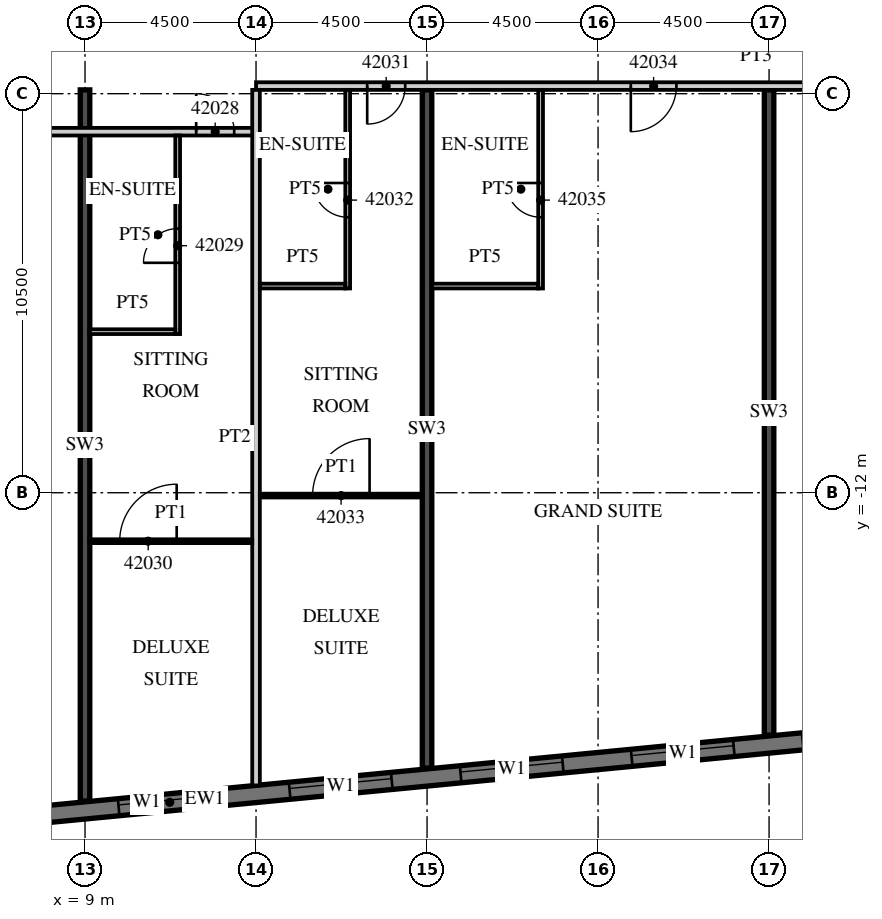
"""IFC4 building model, lengths in metres.
Left out: names, types, materials, properties, quantities, classifications, styles, units other than length and angle.
Written with IfcOpenShell. Run it as: python <this file> out.ifc"""

import sys

from ifc_helpers import new_model, si_unit, direction, frame, frame_2d, origin, place, context, subcontext, project, spatial, rectangle, extrude, element, fill, save


model = new_model("IFC4")
c1 = context("Model", 3, precision=1e-05, world=origin(), true_north=direction((0.0, 1.0)))
c2 = subcontext(c1, "Body", "Model", "MODEL_VIEW")
j1 = project(units=[si_unit("LENGTHUNIT", "METRE"), si_unit("PLANEANGLEUNIT", "RADIAN")], contexts=[c1])
p1 = place(None, origin())
s1 = spatial("IfcSite", under=j1, at=p1, CompositionType="ELEMENT")
p2 = place(p1, origin())
s2 = spatial("IfcBuilding", under=s1, at=p2, CompositionType="ELEMENT")
p3 = place(p2, frame((0.0, 0.0, 180.1)))
s3 = spatial("IfcBuildingStorey", under=s2, at=p3, CompositionType="ELEMENT", Elevation=180.1)
p4 = place(p3, frame((9.0, -20.112, 0.0), z_axis=(0.0, 0.0, 1.0), x_axis=(0.0, 1.0, 0.0)))
e1 = element("IfcWall", 1, at=p4, inside=s3, PredefinedType="SHEAR", context=c2, shape_type="SweptSolid", body=[
    extrude(rectangle(XDim=18.712, YDim=0.25, at=frame_2d((9.356, 0.0))), origin(), (0.0, 0.0, 1.0), 3.3),
])
p5 = place(p3, frame((18.0, -19.245, 0.0), z_axis=(0.0, 0.0, 1.0), x_axis=(0.0, 1.0, 0.0)))
e2 = element("IfcWall", 2, at=p5, inside=s3, PredefinedType="SHEAR", context=c2, shape_type="SweptSolid", body=[
    extrude(rectangle(XDim=17.845, YDim=0.25, at=frame_2d((8.923, 0.0))), origin(), (0.0, 0.0, 1.0), 3.3),
])
p6 = place(p3, frame((27.0, -18.379, 0.0), z_axis=(0.0, 0.0, 1.0), x_axis=(0.0, 1.0, 0.0)))
e3 = element("IfcWall", 3, at=p6, inside=s3, PredefinedType="SHEAR", context=c2, shape_type="SweptSolid", body=[
    extrude(rectangle(XDim=16.979, YDim=0.25, at=frame_2d((8.489, 0.0))), origin(), (0.0, 0.0, 1.0), 3.3),
])
p7 = place(p3, frame((-13.521, -22.529, 0.0), z_axis=(0.0, 0.0, 1.0), x_axis=(0.995396436651, 0.095843277819, 0.0)))
e4 = element("IfcWall", 4, at=p7, inside=s3, PredefinedType="SOLIDWALL", context=c2, shape_type="SweptSolid", body=[
    extrude(rectangle(XDim=51.578, YDim=0.45, at=frame_2d((25.789, 0.0))), origin(), (0.0, 0.0, 1.0), 3.02),
])
p8 = place(p7, frame((0.91, 0.0, 0.45)))
e5 = element("IfcOpeningElement", 5, at=p8, cuts=e4, PredefinedType="OPENING", context=c2, shape_type="SweptSolid", body=[
    extrude(rectangle(XDim=2.7, YDim=2.25, at=frame_2d((1.35, 1.125))), frame((0.0, 0.235, 0.0), z_axis=(0.0, -1.0, 0.0), x_axis=(1.0, 0.0, 0.0)), (0.0, 0.0, 1.0), 0.47),
])
p9 = place(p7, frame((5.431, 0.0, 0.45)))
e6 = element("IfcOpeningElement", 6, at=p9, cuts=e4, PredefinedType="OPENING", context=c2, shape_type="SweptSolid", body=[
    extrude(rectangle(XDim=2.7, YDim=2.25, at=frame_2d((1.35, 1.125))), frame((0.0, 0.235, 0.0), z_axis=(0.0, -1.0, 0.0), x_axis=(1.0, 0.0, 0.0)), (0.0, 0.0, 1.0), 0.47),
])
p10 = place(p7, frame((9.952, 0.0, 0.45)))
e7 = element("IfcOpeningElement", 7, at=p10, cuts=e4, PredefinedType="OPENING", context=c2, shape_type="SweptSolid", body=[
    extrude(rectangle(XDim=2.7, YDim=2.25, at=frame_2d((1.35, 1.125))), frame((0.0, 0.235, 0.0), z_axis=(0.0, -1.0, 0.0), x_axis=(1.0, 0.0, 0.0)), (0.0, 0.0, 1.0), 0.47),
])
p11 = place(p7, frame((14.473, 0.0, 0.45)))
e8 = element("IfcOpeningElement", 8, at=p11, cuts=e4, PredefinedType="OPENING", context=c2, shape_type="SweptSolid", body=[
    extrude(rectangle(XDim=2.7, YDim=2.25, at=frame_2d((1.35, 1.125))), frame((0.0, 0.235, 0.0), z_axis=(0.0, -1.0, 0.0), x_axis=(1.0, 0.0, 0.0)), (0.0, 0.0, 1.0), 0.47),
])
p12 = place(p7, frame((18.994, 0.0, 0.45)))
e9 = element("IfcOpeningElement", 9, at=p12, cuts=e4, PredefinedType="OPENING", context=c2, shape_type="SweptSolid", body=[
    extrude(rectangle(XDim=2.7, YDim=2.25, at=frame_2d((1.35, 1.125))), frame((0.0, 0.235, 0.0), z_axis=(0.0, -1.0, 0.0), x_axis=(1.0, 0.0, 0.0)), (0.0, 0.0, 1.0), 0.47),
])
p13 = place(p7, frame((23.514, 0.0, 0.45)))
e10 = element("IfcOpeningElement", 10, at=p13, cuts=e4, PredefinedType="OPENING", context=c2, shape_type="SweptSolid", body=[
    extrude(rectangle(XDim=2.7, YDim=2.25, at=frame_2d((1.35, 1.125))), frame((0.0, 0.235, 0.0), z_axis=(0.0, -1.0, 0.0), x_axis=(1.0, 0.0, 0.0)), (0.0, 0.0, 1.0), 0.47),
])
p14 = place(p7, frame((28.035, 0.0, 0.45)))
e11 = element("IfcOpeningElement", 11, at=p14, cuts=e4, PredefinedType="OPENING", context=c2, shape_type="SweptSolid", body=[
    extrude(rectangle(XDim=2.7, YDim=2.25, at=frame_2d((1.35, 1.125))), frame((0.0, 0.235, 0.0), z_axis=(0.0, -1.0, 0.0), x_axis=(1.0, 0.0, 0.0)), (0.0, 0.0, 1.0), 0.47),
])
p15 = place(p7, frame((32.556, 0.0, 0.45)))
e12 = element("IfcOpeningElement", 12, at=p15, cuts=e4, PredefinedType="OPENING", context=c2, shape_type="SweptSolid", body=[
    extrude(rectangle(XDim=2.7, YDim=2.25, at=frame_2d((1.35, 1.125))), frame((0.0, 0.235, 0.0), z_axis=(0.0, -1.0, 0.0), x_axis=(1.0, 0.0, 0.0)), (0.0, 0.0, 1.0), 0.47),
])
p16 = place(p7, frame((37.077, 0.0, 0.45)))
e13 = element("IfcOpeningElement", 13, at=p16, cuts=e4, PredefinedType="OPENING", context=c2, shape_type="SweptSolid", body=[
    extrude(rectangle(XDim=2.7, YDim=2.25, at=frame_2d((1.35, 1.125))), frame((0.0, 0.235, 0.0), z_axis=(0.0, -1.0, 0.0), x_axis=(1.0, 0.0, 0.0)), (0.0, 0.0, 1.0), 0.47),
])
p17 = place(p7, frame((41.598, 0.0, 0.45)))
e14 = element("IfcOpeningElement", 14, at=p17, cuts=e4, PredefinedType="OPENING", context=c2, shape_type="SweptSolid", body=[
    extrude(rectangle(XDim=2.7, YDim=2.25, at=frame_2d((1.35, 1.125))), frame((0.0, 0.235, 0.0), z_axis=(0.0, -1.0, 0.0), x_axis=(1.0, 0.0, 0.0)), (0.0, 0.0, 1.0), 0.47),
])
p18 = place(p7, frame((46.119, 0.0, 0.45)))
e15 = element("IfcOpeningElement", 15, at=p18, cuts=e4, PredefinedType="OPENING", context=c2, shape_type="SweptSolid", body=[
    extrude(rectangle(XDim=2.7, YDim=2.25, at=frame_2d((1.35, 1.125))), frame((0.0, 0.235, 0.0), z_axis=(0.0, -1.0, 0.0), x_axis=(1.0, 0.0, 0.0)), (0.0, 0.0, 1.0), 0.47),
])
p19 = place(p3, frame((-13.5, -2.5, 0.0), z_axis=(0.0, 0.0, 1.0), x_axis=(1.0, 0.0, 0.0)))
e16 = element("IfcWall", 16, at=p19, inside=s3, PredefinedType="PARTITIONING", context=c2, shape_type="SweptSolid", body=[
    extrude(rectangle(XDim=27.0, YDim=0.2, at=frame_2d((13.5, 0.0))), origin(), (0.0, 0.0, 1.0), 3.02),
])
p20 = place(p19, frame((2.925, 0.0, 0.0)))
e17 = element("IfcOpeningElement", 17, at=p20, cuts=e16, PredefinedType="OPENING", context=c2, shape_type="SweptSolid", body=[
    extrude(rectangle(XDim=1.0, YDim=2.1, at=frame_2d((0.5, 1.05))), frame((0.0, 0.11, 0.0), z_axis=(0.0, -1.0, 0.0), x_axis=(1.0, 0.0, 0.0)), (0.0, 0.0, 1.0), 0.22),
])
p21 = place(p19, frame((7.45, 0.0, 0.0)))
e18 = element("IfcOpeningElement", 18, at=p21, cuts=e16, PredefinedType="OPENING", context=c2, shape_type="SweptSolid", body=[
    extrude(rectangle(XDim=1.0, YDim=2.1, at=frame_2d((0.5, 1.05))), frame((0.0, 0.11, 0.0), z_axis=(0.0, -1.0, 0.0), x_axis=(1.0, 0.0, 0.0)), (0.0, 0.0, 1.0), 0.22),
])
p22 = place(p19, frame((11.925, 0.0, 0.0)))
e19 = element("IfcOpeningElement", 19, at=p22, cuts=e16, PredefinedType="OPENING", context=c2, shape_type="SweptSolid", body=[
    extrude(rectangle(XDim=1.0, YDim=2.1, at=frame_2d((0.5, 1.05))), frame((0.0, 0.11, 0.0), z_axis=(0.0, -1.0, 0.0), x_axis=(1.0, 0.0, 0.0)), (0.0, 0.0, 1.0), 0.22),
])
p23 = place(p19, frame((18.862, 0.0, 0.0)))
e20 = element("IfcOpeningElement", 20, at=p23, cuts=e16, PredefinedType="OPENING", context=c2, shape_type="SweptSolid", body=[
    extrude(rectangle(XDim=1.2, YDim=2.1, at=frame_2d((0.6, 1.05))), frame((0.0, 0.11, 0.0), z_axis=(0.0, -1.0, 0.0), x_axis=(1.0, 0.0, 0.0)), (0.0, 0.0, 1.0), 0.22),
])
p24 = place(p19, frame((25.425, 0.0, 0.0)))
e21 = element("IfcOpeningElement", 21, at=p24, cuts=e16, PredefinedType="OPENING", context=c2, shape_type="SweptSolid", body=[
    extrude(rectangle(XDim=1.0, YDim=2.1, at=frame_2d((0.5, 1.05))), frame((0.0, 0.11, 0.0), z_axis=(0.0, -1.0, 0.0), x_axis=(1.0, 0.0, 0.0)), (0.0, 0.0, 1.0), 0.22),
])
p25 = place(p3, frame((13.5, -1.3, 0.0), z_axis=(0.0, 0.0, 1.0), x_axis=(1.0, 0.0, 0.0)))
e22 = element("IfcWall", 22, at=p25, inside=s3, PredefinedType="PARTITIONING", context=c2, shape_type="SweptSolid", body=[
    extrude(rectangle(XDim=26.317, YDim=0.2, at=frame_2d((13.158, 0.0))), origin(), (0.0, 0.0, 1.0), 3.02),
])
p26 = place(p25, frame((2.925, 0.0, 0.0)))
e23 = element("IfcOpeningElement", 23, at=p26, cuts=e22, PredefinedType="OPENING", context=c2, shape_type="SweptSolid", body=[
    extrude(rectangle(XDim=1.0, YDim=2.1, at=frame_2d((0.5, 1.05))), frame((0.0, 0.11, 0.0), z_axis=(0.0, -1.0, 0.0), x_axis=(1.0, 0.0, 0.0)), (0.0, 0.0, 1.0), 0.22),
])
p27 = place(p25, frame((9.862, 0.0, 0.0)))
e24 = element("IfcOpeningElement", 24, at=p27, cuts=e22, PredefinedType="OPENING", context=c2, shape_type="SweptSolid", body=[
    extrude(rectangle(XDim=1.2, YDim=2.1, at=frame_2d((0.6, 1.05))), frame((0.0, 0.11, 0.0), z_axis=(0.0, -1.0, 0.0), x_axis=(1.0, 0.0, 0.0)), (0.0, 0.0, 1.0), 0.22),
])
p28 = place(p25, frame((15.938, 0.0, 0.0)))
e25 = element("IfcOpeningElement", 25, at=p28, cuts=e22, PredefinedType="OPENING", context=c2, shape_type="SweptSolid", body=[
    extrude(rectangle(XDim=1.2, YDim=2.1, at=frame_2d((0.6, 1.05))), frame((0.0, 0.11, 0.0), z_axis=(0.0, -1.0, 0.0), x_axis=(1.0, 0.0, 0.0)), (0.0, 0.0, 1.0), 0.22),
])
p29 = place(p25, frame((25.208, 0.0, 0.0)))
e26 = element("IfcOpeningElement", 26, at=p29, cuts=e22, PredefinedType="OPENING", context=c2, shape_type="SweptSolid", body=[
    extrude(rectangle(XDim=0.9, YDim=2.1, at=frame_2d((0.45, 1.05))), frame((0.0, 0.11, 0.0), z_axis=(0.0, -1.0, 0.0), x_axis=(1.0, 0.0, 0.0)), (0.0, 0.0, 1.0), 0.22),
])
p30 = place(p3, frame((13.5, -19.701, 0.0), z_axis=(0.0, 0.0, 1.0), x_axis=(0.0, 1.0, 0.0)))
e27 = element("IfcWall", 27, at=p30, inside=s3, PredefinedType="PARTITIONING", context=c2, shape_type="SweptSolid", body=[
    extrude(rectangle(XDim=18.301, YDim=0.2, at=frame_2d((9.15, 0.0))), origin(), (0.0, 0.0, 1.0), 3.02),
])
p31 = place(p3, frame((11.438, -7.825, 0.0), z_axis=(0.0, 0.0, 1.0), x_axis=(0.0, 1.0, 0.0)))
e28 = element("IfcWall", 28, at=p31, inside=s3, PredefinedType="PARTITIONING", context=c2, shape_type="SweptSolid", body=[
    extrude(rectangle(XDim=5.225, YDim=0.125, at=frame_2d((2.612, 0.0))), origin(), (0.0, 0.0, 1.0), 3.02),
])
p32 = place(p31, frame((1.875, 0.0, 0.0)))
e29 = element("IfcOpeningElement", 29, at=p32, cuts=e28, PredefinedType="OPENING", context=c2, shape_type="SweptSolid", body=[
    extrude(rectangle(XDim=0.9, YDim=2.1, at=frame_2d((0.45, 1.05))), frame((0.0, 0.073, 0.0), z_axis=(0.0, -1.0, 0.0), x_axis=(1.0, 0.0, 0.0)), (0.0, 0.0, 1.0), 0.145),
])
p33 = place(p3, frame((9.125, -7.762, 0.0), z_axis=(0.0, 0.0, 1.0), x_axis=(1.0, 0.0, 0.0)))
e30 = element("IfcWall", 30, at=p33, inside=s3, PredefinedType="PARTITIONING", context=c2, shape_type="SweptSolid", body=[
    extrude(rectangle(XDim=2.25, YDim=0.125, at=frame_2d((1.125, 0.0))), origin(), (0.0, 0.0, 1.0), 3.02),
])
p34 = place(p3, frame((9.125, -13.275, 0.0), z_axis=(0.0, 0.0, 1.0), x_axis=(1.0, 0.0, 0.0)))
e31 = element("IfcWall", 31, at=p34, inside=s3, PredefinedType="PARTITIONING", context=c2, shape_type="SweptSolid", body=[
    extrude(rectangle(XDim=4.275, YDim=0.1, at=frame_2d((2.137, 0.0))), origin(), (0.0, 0.0, 1.0), 3.02),
])
p35 = place(p34, frame((0.787, 0.0, 0.0)))
e32 = element("IfcOpeningElement", 32, at=p35, cuts=e31, PredefinedType="OPENING", context=c2, shape_type="SweptSolid", body=[
    extrude(rectangle(XDim=1.5, YDim=2.1, at=frame_2d((0.75, 1.05))), frame((0.0, 0.06, 0.0), z_axis=(0.0, -1.0, 0.0), x_axis=(1.0, 0.0, 0.0)), (0.0, 0.0, 1.0), 0.12),
])
p36 = place(p3, frame((15.912, -6.625, 0.0), z_axis=(0.0, 0.0, 1.0), x_axis=(0.0, 1.0, 0.0)))
e33 = element("IfcWall", 33, at=p36, inside=s3, PredefinedType="PARTITIONING", context=c2, shape_type="SweptSolid", body=[
    extrude(rectangle(XDim=5.225, YDim=0.125, at=frame_2d((2.613, 0.0))), origin(), (0.0, 0.0, 1.0), 3.02),
])
p37 = place(p36, frame((1.875, 0.0, 0.0)))
e34 = element("IfcOpeningElement", 34, at=p37, cuts=e33, PredefinedType="OPENING", context=c2, shape_type="SweptSolid", body=[
    extrude(rectangle(XDim=0.9, YDim=2.1, at=frame_2d((0.45, 1.05))), frame((0.0, 0.073, 0.0), z_axis=(0.0, -1.0, 0.0), x_axis=(1.0, 0.0, 0.0)), (0.0, 0.0, 1.0), 0.145),
])
p38 = place(p3, frame((13.6, -6.562, 0.0), z_axis=(0.0, 0.0, 1.0), x_axis=(1.0, 0.0, 0.0)))
e35 = element("IfcWall", 35, at=p38, inside=s3, PredefinedType="PARTITIONING", context=c2, shape_type="SweptSolid", body=[
    extrude(rectangle(XDim=2.25, YDim=0.125, at=frame_2d((1.125, 0.0))), origin(), (0.0, 0.0, 1.0), 3.02),
])
p39 = place(p3, frame((13.6, -12.075, 0.0), z_axis=(0.0, 0.0, 1.0), x_axis=(1.0, 0.0, 0.0)))
e36 = element("IfcWall", 36, at=p39, inside=s3, PredefinedType="PARTITIONING", context=c2, shape_type="SweptSolid", body=[
    extrude(rectangle(XDim=4.275, YDim=0.1, at=frame_2d((2.137, 0.0))), origin(), (0.0, 0.0, 1.0), 3.02),
])
p40 = place(p39, frame((1.388, 0.0, 0.0)))
e37 = element("IfcOpeningElement", 37, at=p40, cuts=e36, PredefinedType="OPENING", context=c2, shape_type="SweptSolid", body=[
    extrude(rectangle(XDim=1.5, YDim=2.1, at=frame_2d((0.75, 1.05))), frame((0.0, 0.06, 0.0), z_axis=(0.0, -1.0, 0.0), x_axis=(1.0, 0.0, 0.0)), (0.0, 0.0, 1.0), 0.12),
])
p41 = place(p3, frame((20.988, -6.625, 0.0), z_axis=(0.0, 0.0, 1.0), x_axis=(0.0, 1.0, 0.0)))
e38 = element("IfcWall", 38, at=p41, inside=s3, PredefinedType="PARTITIONING", context=c2, shape_type="SweptSolid", body=[
    extrude(rectangle(XDim=5.225, YDim=0.125, at=frame_2d((2.613, 0.0))), origin(), (0.0, 0.0, 1.0), 3.02),
])
p42 = place(p41, frame((1.875, 0.0, 0.0)))
e39 = element("IfcOpeningElement", 39, at=p42, cuts=e38, PredefinedType="OPENING", context=c2, shape_type="SweptSolid", body=[
    extrude(rectangle(XDim=0.9, YDim=2.1, at=frame_2d((0.45, 1.05))), frame((0.0, 0.073, 0.0), z_axis=(0.0, -1.0, 0.0), x_axis=(1.0, 0.0, 0.0)), (0.0, 0.0, 1.0), 0.145),
])
p43 = place(p3, frame((18.125, -6.562, 0.0), z_axis=(0.0, 0.0, 1.0), x_axis=(1.0, 0.0, 0.0)))
e40 = element("IfcWall", 40, at=p43, inside=s3, PredefinedType="PARTITIONING", context=c2, shape_type="SweptSolid", body=[
    extrude(rectangle(XDim=2.8, YDim=0.125, at=frame_2d((1.4, 0.0))), origin(), (0.0, 0.0, 1.0), 3.02),
])
p44 = place(p13, origin())
e41 = element("IfcWindow", 41, at=p44, inside=s3, PartitioningType="SINGLE_PANEL", PredefinedType="WINDOW", context=c2, shape_type="SweptSolid", body=[
    extrude(rectangle(XDim=2.7, YDim=2.25, at=frame_2d((1.35, 1.125))), frame((0.0, 0.09, 0.0), z_axis=(0.0, -1.0, 0.0), x_axis=(1.0, 0.0, 0.0)), (0.0, 0.0, 1.0), 0.06),
])
fill(e10, e41)
p45 = place(p14, origin())
e42 = element("IfcWindow", 42, at=p45, inside=s3, PartitioningType="SINGLE_PANEL", PredefinedType="WINDOW", context=c2, shape_type="SweptSolid", body=[
    extrude(rectangle(XDim=2.7, YDim=2.25, at=frame_2d((1.35, 1.125))), frame((0.0, 0.09, 0.0), z_axis=(0.0, -1.0, 0.0), x_axis=(1.0, 0.0, 0.0)), (0.0, 0.0, 1.0), 0.06),
])
fill(e11, e42)
p46 = place(p15, origin())
e43 = element("IfcWindow", 43, at=p46, inside=s3, PartitioningType="SINGLE_PANEL", PredefinedType="WINDOW", context=c2, shape_type="SweptSolid", body=[
    extrude(rectangle(XDim=2.7, YDim=2.25, at=frame_2d((1.35, 1.125))), frame((0.0, 0.09, 0.0), z_axis=(0.0, -1.0, 0.0), x_axis=(1.0, 0.0, 0.0)), (0.0, 0.0, 1.0), 0.06),
])
fill(e12, e43)
p47 = place(p16, origin())
e44 = element("IfcWindow", 44, at=p47, inside=s3, PartitioningType="SINGLE_PANEL", PredefinedType="WINDOW", context=c2, shape_type="SweptSolid", body=[
    extrude(rectangle(XDim=2.7, YDim=2.25, at=frame_2d((1.35, 1.125))), frame((0.0, 0.09, 0.0), z_axis=(0.0, -1.0, 0.0), x_axis=(1.0, 0.0, 0.0)), (0.0, 0.0, 1.0), 0.06),
])
fill(e13, e44)
p48 = place(p24, origin())
e45 = element("IfcDoor", 45, at=p48, inside=s3, OperationType="SINGLE_SWING_LEFT", PredefinedType="DOOR", context=c2, shape_type="SweptSolid", body=[
    extrude(rectangle(XDim=1.0, YDim=2.1, at=frame_2d((0.5, 1.05))), frame((0.0, 0.025, 0.0), z_axis=(0.0, -1.0, 0.0), x_axis=(1.0, 0.0, 0.0)), (0.0, 0.0, 1.0), 0.05),
])
fill(e21, e45)
p49 = place(p32, origin())
e46 = element("IfcDoor", 46, at=p49, inside=s3, OperationType="SINGLE_SWING_LEFT", PredefinedType="DOOR", context=c2, shape_type="SweptSolid", body=[
    extrude(rectangle(XDim=0.9, YDim=2.1, at=frame_2d((0.45, 1.05))), frame((0.0, 0.025, 0.0), z_axis=(0.0, -1.0, 0.0), x_axis=(1.0, 0.0, 0.0)), (0.0, 0.0, 1.0), 0.05),
])
fill(e29, e46)
p50 = place(p35, origin())
e47 = element("IfcDoor", 47, at=p50, inside=s3, OperationType="SINGLE_SWING_RIGHT", PredefinedType="DOOR", context=c2, shape_type="SweptSolid", body=[
    extrude(rectangle(XDim=1.5, YDim=2.1, at=frame_2d((0.75, 1.05))), frame((0.0, 0.025, 0.0), z_axis=(0.0, -1.0, 0.0), x_axis=(1.0, 0.0, 0.0)), (0.0, 0.0, 1.0), 0.05),
])
fill(e32, e47)
p51 = place(p26, origin())
e48 = element("IfcDoor", 48, at=p51, inside=s3, OperationType="SINGLE_SWING_LEFT", PredefinedType="DOOR", context=c2, shape_type="SweptSolid", body=[
    extrude(rectangle(XDim=1.0, YDim=2.1, at=frame_2d((0.5, 1.05))), frame((0.0, 0.025, 0.0), z_axis=(0.0, -1.0, 0.0), x_axis=(1.0, 0.0, 0.0)), (0.0, 0.0, 1.0), 0.05),
])
fill(e23, e48)
p52 = place(p37, origin())
e49 = element("IfcDoor", 49, at=p52, inside=s3, OperationType="SINGLE_SWING_RIGHT", PredefinedType="DOOR", context=c2, shape_type="SweptSolid", body=[
    extrude(rectangle(XDim=0.9, YDim=2.1, at=frame_2d((0.45, 1.05))), frame((0.0, 0.025, 0.0), z_axis=(0.0, -1.0, 0.0), x_axis=(1.0, 0.0, 0.0)), (0.0, 0.0, 1.0), 0.05),
])
fill(e34, e49)
p53 = place(p40, origin())
e50 = element("IfcDoor", 50, at=p53, inside=s3, OperationType="SINGLE_SWING_RIGHT", PredefinedType="DOOR", context=c2, shape_type="SweptSolid", body=[
    extrude(rectangle(XDim=1.5, YDim=2.1, at=frame_2d((0.75, 1.05))), frame((0.0, 0.025, 0.0), z_axis=(0.0, -1.0, 0.0), x_axis=(1.0, 0.0, 0.0)), (0.0, 0.0, 1.0), 0.05),
])
fill(e37, e50)
p54 = place(p27, origin())
e51 = element("IfcDoor", 51, at=p54, inside=s3, OperationType="SINGLE_SWING_LEFT", PredefinedType="DOOR", context=c2, shape_type="SweptSolid", body=[
    extrude(rectangle(XDim=1.2, YDim=2.1, at=frame_2d((0.6, 1.05))), frame((0.0, 0.025, 0.0), z_axis=(0.0, -1.0, 0.0), x_axis=(1.0, 0.0, 0.0)), (0.0, 0.0, 1.0), 0.05),
])
fill(e24, e51)
p55 = place(p42, origin())
e52 = element("IfcDoor", 52, at=p55, inside=s3, OperationType="SINGLE_SWING_RIGHT", PredefinedType="DOOR", context=c2, shape_type="SweptSolid", body=[
    extrude(rectangle(XDim=0.9, YDim=2.1, at=frame_2d((0.45, 1.05))), frame((0.0, 0.025, 0.0), z_axis=(0.0, -1.0, 0.0), x_axis=(1.0, 0.0, 0.0)), (0.0, 0.0, 1.0), 0.05),
])
fill(e39, e52)
save(model, sys.argv[1])
